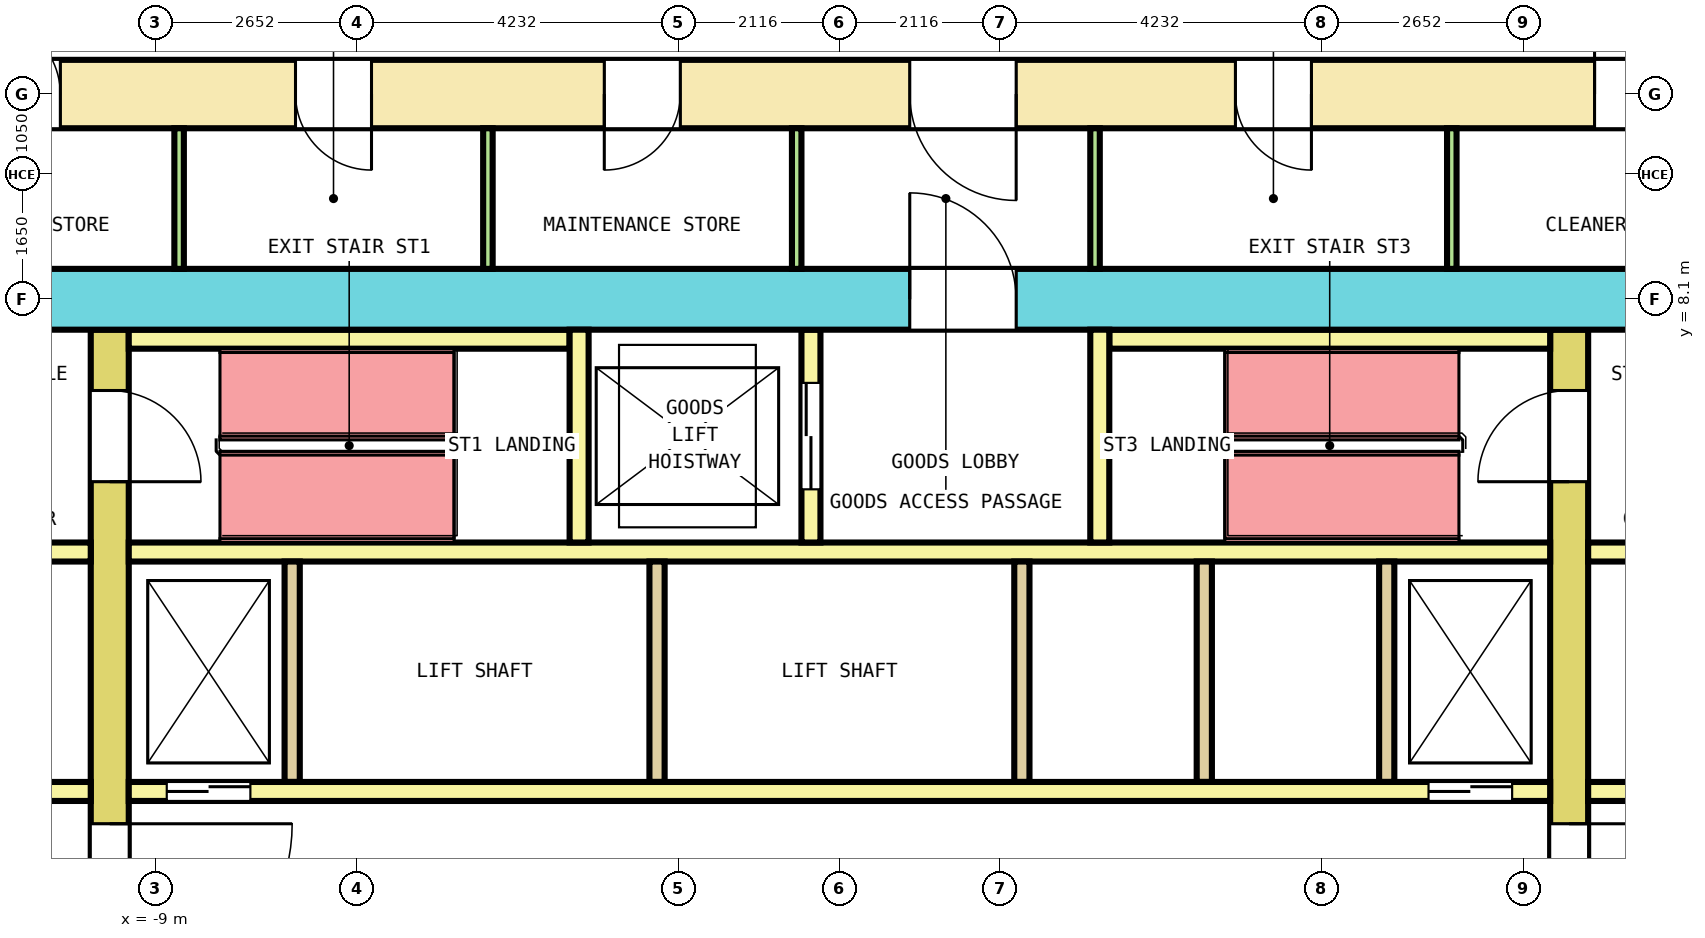
"""IFC4 building model, lengths in metres.
Left out: names, types, materials, properties, quantities, classifications, styles, units other than length and angle.
Written with IfcOpenShell. Run it as: python <this file> out.ifc"""

import sys

from ifc_helpers import new_model, si_unit, direction, frame, frame_2d, origin, place, context, subcontext, project, spatial, rectangle, extrude, element, fill, save


model = new_model("IFC4")
c1 = context("Model", 3, precision=1e-05, world=origin(), true_north=direction((0.0, 1.0)))
c2 = subcontext(c1, "Body", "Model", "MODEL_VIEW")
j1 = project(units=[si_unit("LENGTHUNIT", "METRE"), si_unit("PLANEANGLEUNIT", "RADIAN")], contexts=[c1])
p1 = place(None, origin())
s1 = spatial("IfcSite", under=j1, at=p1, CompositionType="ELEMENT")
p2 = place(p1, origin())
s2 = spatial("IfcBuilding", under=s1, at=p2, CompositionType="ELEMENT")
p3 = place(p2, frame((0.0, 0.0, 32.2)))
s3 = spatial("IfcBuildingStorey", under=s2, at=p3, CompositionType="ELEMENT", Elevation=32.2)
p4 = place(p3, frame((-13.65, 10.8, 0.0), z_axis=(0.0, 0.0, 1.0), x_axis=(1.0, 0.0, 0.0)))
e1 = element("IfcWall", 1, at=p4, inside=s3, PredefinedType="SHEAR", context=c2, shape_type="SweptSolid", body=[
    extrude(rectangle(XDim=27.3, YDim=0.9, at=frame_2d((13.65, 0.0))), origin(), (0.0, 0.0, 1.0), 4.1),
])
p5 = place(p4, frame((2.4, 0.0, 0.0)))
e2 = element("IfcOpeningElement", 2, at=p5, cuts=e1, PredefinedType="OPENING", context=c2, shape_type="SweptSolid", body=[
    extrude(rectangle(XDim=1.0, YDim=2.1, at=frame_2d((0.5, 1.05))), frame((0.0, 0.46, 0.0), z_axis=(0.0, -1.0, 0.0), x_axis=(1.0, 0.0, 0.0)), (0.0, 0.0, 1.0), 0.92),
])
p6 = place(p4, frame((6.494, 0.0, 0.0)))
e3 = element("IfcOpeningElement", 3, at=p6, cuts=e1, PredefinedType="OPENING", context=c2, shape_type="SweptSolid", body=[
    extrude(rectangle(XDim=1.0, YDim=2.1, at=frame_2d((0.5, 1.05))), frame((0.0, 0.46, 0.0), z_axis=(0.0, -1.0, 0.0), x_axis=(1.0, 0.0, 0.0)), (0.0, 0.0, 1.0), 0.92),
])
p7 = place(p4, frame((10.556, 0.0, 0.0)))
e4 = element("IfcOpeningElement", 4, at=p7, cuts=e1, PredefinedType="OPENING", context=c2, shape_type="SweptSolid", body=[
    extrude(rectangle(XDim=1.0, YDim=2.1, at=frame_2d((0.5, 1.05))), frame((0.0, 0.46, 0.0), z_axis=(0.0, -1.0, 0.0), x_axis=(1.0, 0.0, 0.0)), (0.0, 0.0, 1.0), 0.92),
])
p8 = place(p4, frame((18.859, 0.0, 0.0)))
e5 = element("IfcOpeningElement", 5, at=p8, cuts=e1, PredefinedType="OPENING", context=c2, shape_type="SweptSolid", body=[
    extrude(rectangle(XDim=1.0, YDim=2.1, at=frame_2d((0.5, 1.05))), frame((0.0, 0.46, 0.0), z_axis=(0.0, -1.0, 0.0), x_axis=(1.0, 0.0, 0.0)), (0.0, 0.0, 1.0), 0.92),
])
p9 = place(p4, frame((23.584, 0.0, 0.0)))
e6 = element("IfcOpeningElement", 6, at=p9, cuts=e1, PredefinedType="OPENING", context=c2, shape_type="SweptSolid", body=[
    extrude(rectangle(XDim=1.0, YDim=2.1, at=frame_2d((0.5, 1.05))), frame((0.0, 0.46, 0.0), z_axis=(0.0, -1.0, 0.0), x_axis=(1.0, 0.0, 0.0)), (0.0, 0.0, 1.0), 0.92),
])
p10 = place(p4, frame((14.575, 0.0, 0.0)))
e7 = element("IfcOpeningElement", 7, at=p10, cuts=e1, PredefinedType="OPENING", context=c2, shape_type="SweptSolid", body=[
    extrude(rectangle(XDim=1.4, YDim=2.1, at=frame_2d((0.7, 1.05))), frame((0.0, 0.46, 0.0), z_axis=(0.0, -1.0, 0.0), x_axis=(1.0, 0.0, 0.0)), (0.0, 0.0, 1.0), 0.92),
])
p11 = place(p3, frame((-12.75, 8.1, 0.0), z_axis=(0.0, 0.0, 1.0), x_axis=(1.0, 0.0, 0.0)))
e8 = element("IfcWall", 8, at=p11, inside=s3, PredefinedType="SHEAR", context=c2, shape_type="SweptSolid", body=[
    extrude(rectangle(XDim=25.5, YDim=0.8, at=frame_2d((12.75, 0.0))), origin(), (0.0, 0.0, 1.0), 4.1),
])
p12 = place(p11, frame((13.675, 0.0, 0.0)))
e9 = element("IfcOpeningElement", 9, at=p12, cuts=e8, PredefinedType="OPENING", context=c2, shape_type="SweptSolid", body=[
    extrude(rectangle(XDim=1.4, YDim=2.1, at=frame_2d((0.7, 1.05))), frame((0.0, 0.41, 0.0), z_axis=(0.0, -1.0, 0.0), x_axis=(1.0, 0.0, 0.0)), (0.0, 0.0, 1.0), 0.82),
])
p13 = place(p3, frame((-9.6, -7.7, 0.0), z_axis=(0.0, 0.0, 1.0), x_axis=(0.0, 1.0, 0.0)))
e10 = element("IfcWall", 10, at=p13, inside=s3, PredefinedType="SHEAR", context=c2, shape_type="SweptSolid", body=[
    extrude(rectangle(XDim=15.4, YDim=0.5, at=frame_2d((7.7, 0.0))), origin(), (0.0, 0.0, 1.0), 4.1),
])
p14 = place(p13, frame((6.5, 0.0, 0.0)))
e11 = element("IfcOpeningElement", 11, at=p14, cuts=e10, PredefinedType="OPENING", context=c2, shape_type="SweptSolid", body=[
    extrude(rectangle(XDim=2.4, YDim=2.1, at=frame_2d((1.2, 1.05))), frame((0.0, 0.26, 0.0), z_axis=(0.0, -1.0, 0.0), x_axis=(1.0, 0.0, 0.0)), (0.0, 0.0, 1.0), 0.52),
])
p15 = place(p13, frame((13.4, 0.0, 0.0)))
e12 = element("IfcOpeningElement", 12, at=p15, cuts=e10, PredefinedType="OPENING", context=c2, shape_type="SweptSolid", body=[
    extrude(rectangle(XDim=1.2, YDim=2.1, at=frame_2d((0.6, 1.05))), frame((0.0, 0.26, 0.0), z_axis=(0.0, -1.0, 0.0), x_axis=(1.0, 0.0, 0.0)), (0.0, 0.0, 1.0), 0.52),
])
p16 = place(p13, frame((0.8, 0.0, 0.0)))
e13 = element("IfcOpeningElement", 13, at=p16, cuts=e10, PredefinedType="OPENING", context=c2, shape_type="SweptSolid", body=[
    extrude(rectangle(XDim=1.2, YDim=2.1, at=frame_2d((0.6, 1.05))), frame((0.0, 0.26, 0.0), z_axis=(0.0, -1.0, 0.0), x_axis=(1.0, 0.0, 0.0)), (0.0, 0.0, 1.0), 0.52),
])
p17 = place(p3, frame((9.6, -7.7, 0.0), z_axis=(0.0, 0.0, 1.0), x_axis=(0.0, 1.0, 0.0)))
e14 = element("IfcWall", 14, at=p17, inside=s3, PredefinedType="SHEAR", context=c2, shape_type="SweptSolid", body=[
    extrude(rectangle(XDim=15.4, YDim=0.5, at=frame_2d((7.7, 0.0))), origin(), (0.0, 0.0, 1.0), 4.1),
])
p18 = place(p17, frame((6.5, 0.0, 0.0)))
e15 = element("IfcOpeningElement", 15, at=p18, cuts=e14, PredefinedType="OPENING", context=c2, shape_type="SweptSolid", body=[
    extrude(rectangle(XDim=2.4, YDim=2.1, at=frame_2d((1.2, 1.05))), frame((0.0, 0.26, 0.0), z_axis=(0.0, -1.0, 0.0), x_axis=(1.0, 0.0, 0.0)), (0.0, 0.0, 1.0), 0.52),
])
p19 = place(p17, frame((13.4, 0.0, 0.0)))
e16 = element("IfcOpeningElement", 16, at=p19, cuts=e14, PredefinedType="OPENING", context=c2, shape_type="SweptSolid", body=[
    extrude(rectangle(XDim=1.2, YDim=2.1, at=frame_2d((0.6, 1.05))), frame((0.0, 0.26, 0.0), z_axis=(0.0, -1.0, 0.0), x_axis=(1.0, 0.0, 0.0)), (0.0, 0.0, 1.0), 0.52),
])
p20 = place(p17, frame((0.9, 0.0, 0.0)))
e17 = element("IfcOpeningElement", 17, at=p20, cuts=e14, PredefinedType="OPENING", context=c2, shape_type="SweptSolid", body=[
    extrude(rectangle(XDim=1.0, YDim=2.1, at=frame_2d((0.5, 1.05))), frame((0.0, 0.26, 0.0), z_axis=(0.0, -1.0, 0.0), x_axis=(1.0, 0.0, 0.0)), (0.0, 0.0, 1.0), 0.52),
])
p21 = place(p3, frame((-12.75, 1.625, 0.0), z_axis=(0.0, 0.0, 1.0), x_axis=(1.0, 0.0, 0.0)))
e18 = element("IfcWall", 18, at=p21, inside=s3, PredefinedType="SOLIDWALL", context=c2, shape_type="SweptSolid", body=[
    extrude(rectangle(XDim=2.9, YDim=0.25, at=frame_2d((1.45, 0.0))), origin(), (0.0, 0.0, 1.0), 4.1),
])
p22 = place(p21, frame((0.9, 0.0, 0.0)))
e19 = element("IfcOpeningElement", 19, at=p22, cuts=e18, PredefinedType="OPENING", context=c2, shape_type="SweptSolid", body=[
    extrude(rectangle(XDim=1.1, YDim=2.1, at=frame_2d((0.55, 1.05))), frame((0.0, 0.135, 0.0), z_axis=(0.0, -1.0, 0.0), x_axis=(1.0, 0.0, 0.0)), (0.0, 0.0, 1.0), 0.27),
])
p23 = place(p3, frame((-9.35, 1.625, 0.0), z_axis=(0.0, 0.0, 1.0), x_axis=(1.0, 0.0, 0.0)))
e20 = element("IfcWall", 20, at=p23, inside=s3, PredefinedType="SOLIDWALL", context=c2, shape_type="SweptSolid", body=[
    extrude(rectangle(XDim=18.7, YDim=0.25, at=frame_2d((9.35, 0.0))), origin(), (0.0, 0.0, 1.0), 4.1),
])
p24 = place(p23, frame((0.5, 0.0, 0.0)))
e21 = element("IfcOpeningElement", 21, at=p24, cuts=e20, PredefinedType="OPENING", context=c2, shape_type="SweptSolid", body=[
    extrude(rectangle(XDim=1.1, YDim=2.1, at=frame_2d((0.55, 1.05))), frame((0.0, 0.135, 0.0), z_axis=(0.0, -1.0, 0.0), x_axis=(1.0, 0.0, 0.0)), (0.0, 0.0, 1.0), 0.27),
])
p25 = place(p23, frame((17.1, 0.0, 0.0)))
e22 = element("IfcOpeningElement", 22, at=p25, cuts=e20, PredefinedType="OPENING", context=c2, shape_type="SweptSolid", body=[
    extrude(rectangle(XDim=1.1, YDim=2.1, at=frame_2d((0.55, 1.05))), frame((0.0, 0.135, 0.0), z_axis=(0.0, -1.0, 0.0), x_axis=(1.0, 0.0, 0.0)), (0.0, 0.0, 1.0), 0.27),
])
p26 = place(p3, frame((9.85, 1.625, 0.0), z_axis=(0.0, 0.0, 1.0), x_axis=(1.0, 0.0, 0.0)))
e23 = element("IfcWall", 23, at=p26, inside=s3, PredefinedType="SOLIDWALL", context=c2, shape_type="SweptSolid", body=[
    extrude(rectangle(XDim=2.9, YDim=0.25, at=frame_2d((1.45, 0.0))), origin(), (0.0, 0.0, 1.0), 4.1),
])
p27 = place(p26, frame((0.9, 0.0, 0.0)))
e24 = element("IfcOpeningElement", 24, at=p27, cuts=e23, PredefinedType="OPENING", context=c2, shape_type="SweptSolid", body=[
    extrude(rectangle(XDim=1.1, YDim=2.1, at=frame_2d((0.55, 1.05))), frame((0.0, 0.135, 0.0), z_axis=(0.0, -1.0, 0.0), x_axis=(1.0, 0.0, 0.0)), (0.0, 0.0, 1.0), 0.27),
])
p28 = place(p3, frame((-12.75, 4.775, 0.0), z_axis=(0.0, 0.0, 1.0), x_axis=(1.0, 0.0, 0.0)))
e25 = element("IfcWall", 25, at=p28, inside=s3, PredefinedType="SOLIDWALL", context=c2, shape_type="SweptSolid", body=[
    extrude(rectangle(XDim=2.9, YDim=0.25, at=frame_2d((1.45, 0.0))), origin(), (0.0, 0.0, 1.0), 4.1),
])
p29 = place(p3, frame((-9.35, 4.775, 0.0), z_axis=(0.0, 0.0, 1.0), x_axis=(1.0, 0.0, 0.0)))
e26 = element("IfcWall", 26, at=p29, inside=s3, PredefinedType="SOLIDWALL", context=c2, shape_type="SweptSolid", body=[
    extrude(rectangle(XDim=18.7, YDim=0.25, at=frame_2d((9.35, 0.0))), origin(), (0.0, 0.0, 1.0), 4.1),
])
p30 = place(p3, frame((9.85, 4.775, 0.0), z_axis=(0.0, 0.0, 1.0), x_axis=(1.0, 0.0, 0.0)))
e27 = element("IfcWall", 27, at=p30, inside=s3, PredefinedType="SOLIDWALL", context=c2, shape_type="SweptSolid", body=[
    extrude(rectangle(XDim=2.9, YDim=0.25, at=frame_2d((1.45, 0.0))), origin(), (0.0, 0.0, 1.0), 4.1),
])
for number, where, z_axis, x_axis in (
    (28, (-7.2, 1.75, 0.0), (0.0, 0.0, 1.0), (0.0, 1.0, 0.0)),
    (29, (-2.4, 1.75, 0.0), (0.0, 0.0, 1.0), (0.0, 1.0, 0.0)),
    (30, (2.4, 1.75, 0.0), (0.0, 0.0, 1.0), (0.0, 1.0, 0.0)),
    (31, (4.8, 1.75, 0.0), (0.0, 0.0, 1.0), (0.0, 1.0, 0.0)),
    (32, (7.2, 1.75, 0.0), (0.0, 0.0, 1.0), (0.0, 1.0, 0.0)),
):
    element("IfcWall", number, at=place(p3, frame(where, z_axis=z_axis, x_axis=x_axis)), inside=s3, PredefinedType="SOLIDWALL", context=c2, shape_type="SweptSolid", body=[
        extrude(rectangle(XDim=2.9, YDim=0.2, at=frame_2d((1.45, 0.0))), origin(), (0.0, 0.0, 1.0), 4.1),
    ])
for number, where, z_axis, x_axis in (
    (33, (-9.35, 7.575, 0.0), (0.0, 0.0, 1.0), (1.0, 0.0, 0.0)),
    (34, (3.55, 7.575, 0.0), (0.0, 0.0, 1.0), (1.0, 0.0, 0.0)),
):
    element("IfcWall", number, at=place(p3, frame(where, z_axis=z_axis, x_axis=x_axis)), inside=s3, PredefinedType="SOLIDWALL", context=c2, shape_type="SweptSolid", body=[
        extrude(rectangle(XDim=5.8, YDim=0.25, at=frame_2d((2.9, 0.0))), origin(), (0.0, 0.0, 1.0), 4.1),
    ])
p31 = place(p3, frame((-3.425, 4.9, 0.0), z_axis=(0.0, 0.0, 1.0), x_axis=(0.0, 1.0, 0.0)))
e35 = element("IfcWall", 35, at=p31, inside=s3, PredefinedType="SOLIDWALL", context=c2, shape_type="SweptSolid", body=[
    extrude(rectangle(XDim=2.8, YDim=0.25, at=frame_2d((1.4, 0.0))), origin(), (0.0, 0.0, 1.0), 4.1),
])
p32 = place(p3, frame((-0.375, 4.9, 0.0), z_axis=(0.0, 0.0, 1.0), x_axis=(0.0, 1.0, 0.0)))
e36 = element("IfcWall", 36, at=p32, inside=s3, PredefinedType="SOLIDWALL", context=c2, shape_type="SweptSolid", body=[
    extrude(rectangle(XDim=2.8, YDim=0.25, at=frame_2d((1.4, 0.0))), origin(), (0.0, 0.0, 1.0), 4.1),
])
p33 = place(p32, frame((0.7, 0.0, 0.0)))
e37 = element("IfcOpeningElement", 37, at=p33, cuts=e36, PredefinedType="OPENING", context=c2, shape_type="SweptSolid", body=[
    extrude(rectangle(XDim=1.4, YDim=2.1, at=frame_2d((0.7, 1.05))), frame((0.0, 0.135, 0.0), z_axis=(0.0, -1.0, 0.0), x_axis=(1.0, 0.0, 0.0)), (0.0, 0.0, 1.0), 0.27),
])
p34 = place(p3, frame((3.425, 4.9, 0.0), z_axis=(0.0, 0.0, 1.0), x_axis=(0.0, 1.0, 0.0)))
e38 = element("IfcWall", 38, at=p34, inside=s3, PredefinedType="SOLIDWALL", context=c2, shape_type="SweptSolid", body=[
    extrude(rectangle(XDim=2.8, YDim=0.25, at=frame_2d((1.4, 0.0))), origin(), (0.0, 0.0, 1.0), 4.1),
])
for number, where, z_axis, x_axis in (
    (39, (-8.688, 8.5, 0.0), (0.0, 0.0, 1.0), (0.0, 1.0, 0.0)),
    (40, (-4.625, 8.5, 0.0), (0.0, 0.0, 1.0), (0.0, 1.0, 0.0)),
    (41, (-0.562, 8.5, 0.0), (0.0, 0.0, 1.0), (0.0, 1.0, 0.0)),
    (42, (3.363, 8.5, 0.0), (0.0, 0.0, 1.0), (0.0, 1.0, 0.0)),
    (43, (8.056, 8.5, 0.0), (0.0, 0.0, 1.0), (0.0, 1.0, 0.0)),
):
    element("IfcWall", number, at=place(p3, frame(where, z_axis=z_axis, x_axis=x_axis)), inside=s3, PredefinedType="PARTITIONING", context=c2, shape_type="SweptSolid", body=[
        extrude(rectangle(XDim=1.85, YDim=0.125, at=frame_2d((0.925, 0.0))), origin(), (0.0, 0.0, 1.0), 4.1),
    ])
p35 = place(p24, origin())
e44 = element("IfcDoor", 44, at=p35, inside=s3, OperationType="DOUBLE_DOOR_SLIDING", PredefinedType="DOOR", context=c2, shape_type="SweptSolid", body=[
    extrude(rectangle(XDim=1.1, YDim=2.1, at=frame_2d((0.55, 1.05))), frame((0.0, 0.075, 0.0), z_axis=(0.0, -1.0, 0.0), x_axis=(1.0, 0.0, 0.0)), (0.0, 0.0, 1.0), 0.15),
])
fill(e21, e44)
p36 = place(p25, origin())
e45 = element("IfcDoor", 45, at=p36, inside=s3, OperationType="DOUBLE_DOOR_SLIDING", PredefinedType="DOOR", context=c2, shape_type="SweptSolid", body=[
    extrude(rectangle(XDim=1.1, YDim=2.1, at=frame_2d((0.55, 1.05))), frame((0.0, 0.075, 0.0), z_axis=(0.0, -1.0, 0.0), x_axis=(1.0, 0.0, 0.0)), (0.0, 0.0, 1.0), 0.15),
])
fill(e22, e45)
p37 = place(p33, origin())
e46 = element("IfcDoor", 46, at=p37, inside=s3, OperationType="DOUBLE_DOOR_SLIDING", PredefinedType="DOOR", context=c2, shape_type="SweptSolid", body=[
    extrude(rectangle(XDim=1.4, YDim=2.1, at=frame_2d((0.7, 1.05))), frame((0.0, 0.075, 0.0), z_axis=(0.0, -1.0, 0.0), x_axis=(1.0, 0.0, 0.0)), (0.0, 0.0, 1.0), 0.15),
])
fill(e37, e46)
p38 = place(p14, origin())
e47 = element("IfcDoor", 47, at=p38, inside=s3, OperationType="DOUBLE_DOOR_SINGLE_SWING", PredefinedType="DOOR", context=c2, shape_type="SweptSolid", body=[
    extrude(rectangle(XDim=2.4, YDim=2.1, at=frame_2d((1.2, 1.05))), frame((0.0, 0.2, 0.0), z_axis=(0.0, -1.0, 0.0), x_axis=(1.0, 0.0, 0.0)), (0.0, 0.0, 1.0), 0.4),
])
fill(e11, e47)
p39 = place(p18, origin())
e48 = element("IfcDoor", 48, at=p39, inside=s3, OperationType="DOUBLE_DOOR_SINGLE_SWING", PredefinedType="DOOR", context=c2, shape_type="SweptSolid", body=[
    extrude(rectangle(XDim=2.4, YDim=2.1, at=frame_2d((1.2, 1.05))), frame((0.0, 0.2, 0.0), z_axis=(0.0, -1.0, 0.0), x_axis=(1.0, 0.0, 0.0)), (0.0, 0.0, 1.0), 0.4),
])
fill(e15, e48)
p40 = place(p15, origin())
e49 = element("IfcDoor", 49, at=p40, inside=s3, OperationType="SINGLE_SWING_RIGHT", PredefinedType="DOOR", context=c2, shape_type="SweptSolid", body=[
    extrude(rectangle(XDim=1.2, YDim=2.1, at=frame_2d((0.6, 1.05))), frame((0.0, 0.2, 0.0), z_axis=(0.0, -1.0, 0.0), x_axis=(1.0, 0.0, 0.0)), (0.0, 0.0, 1.0), 0.4),
])
fill(e12, e49)
p41 = place(p19, origin())
e50 = element("IfcDoor", 50, at=p41, inside=s3, OperationType="SINGLE_SWING_RIGHT", PredefinedType="DOOR", context=c2, shape_type="SweptSolid", body=[
    extrude(rectangle(XDim=1.2, YDim=2.1, at=frame_2d((0.6, 1.05))), frame((0.0, 0.2, 0.0), z_axis=(0.0, -1.0, 0.0), x_axis=(1.0, 0.0, 0.0)), (0.0, 0.0, 1.0), 0.4),
])
fill(e16, e50)
p42 = place(p12, origin())
e51 = element("IfcDoor", 51, at=p42, inside=s3, OperationType="DOUBLE_DOOR_SINGLE_SWING", PredefinedType="DOOR", context=c2, shape_type="SweptSolid", body=[
    extrude(rectangle(XDim=1.4, YDim=2.1, at=frame_2d((0.7, 1.05))), frame((0.0, 0.3, 0.0), z_axis=(0.0, -1.0, 0.0), x_axis=(1.0, 0.0, 0.0)), (0.0, 0.0, 1.0), 0.6),
])
fill(e9, e51)
p43 = place(p5, origin())
e52 = element("IfcDoor", 52, at=p43, inside=s3, OperationType="SINGLE_SWING_LEFT", PredefinedType="DOOR", context=c2, shape_type="SweptSolid", body=[
    extrude(rectangle(XDim=1.0, YDim=2.1, at=frame_2d((0.5, 1.05))), frame((0.0, 0.3, 0.0), z_axis=(0.0, -1.0, 0.0), x_axis=(1.0, 0.0, 0.0)), (0.0, 0.0, 1.0), 0.6),
])
fill(e2, e52)
p44 = place(p6, origin())
e53 = element("IfcDoor", 53, at=p44, inside=s3, OperationType="SINGLE_SWING_RIGHT", PredefinedType="DOOR", context=c2, shape_type="SweptSolid", body=[
    extrude(rectangle(XDim=1.0, YDim=2.1, at=frame_2d((0.5, 1.05))), frame((0.0, 0.3, 0.0), z_axis=(0.0, -1.0, 0.0), x_axis=(1.0, 0.0, 0.0)), (0.0, 0.0, 1.0), 0.6),
])
fill(e3, e53)
p45 = place(p7, origin())
e54 = element("IfcDoor", 54, at=p45, inside=s3, OperationType="SINGLE_SWING_LEFT", PredefinedType="DOOR", context=c2, shape_type="SweptSolid", body=[
    extrude(rectangle(XDim=1.0, YDim=2.1, at=frame_2d((0.5, 1.05))), frame((0.0, 0.3, 0.0), z_axis=(0.0, -1.0, 0.0), x_axis=(1.0, 0.0, 0.0)), (0.0, 0.0, 1.0), 0.6),
])
fill(e4, e54)
p46 = place(p8, origin())
e55 = element("IfcDoor", 55, at=p46, inside=s3, OperationType="SINGLE_SWING_RIGHT", PredefinedType="DOOR", context=c2, shape_type="SweptSolid", body=[
    extrude(rectangle(XDim=1.0, YDim=2.1, at=frame_2d((0.5, 1.05))), frame((0.0, 0.3, 0.0), z_axis=(0.0, -1.0, 0.0), x_axis=(1.0, 0.0, 0.0)), (0.0, 0.0, 1.0), 0.6),
])
fill(e5, e55)
p47 = place(p9, origin())
e56 = element("IfcDoor", 56, at=p47, inside=s3, OperationType="SINGLE_SWING_LEFT", PredefinedType="DOOR", context=c2, shape_type="SweptSolid", body=[
    extrude(rectangle(XDim=1.0, YDim=2.1, at=frame_2d((0.5, 1.05))), frame((0.0, 0.3, 0.0), z_axis=(0.0, -1.0, 0.0), x_axis=(1.0, 0.0, 0.0)), (0.0, 0.0, 1.0), 0.6),
])
fill(e6, e56)
p48 = place(p10, origin())
e57 = element("IfcDoor", 57, at=p48, inside=s3, OperationType="DOUBLE_DOOR_SINGLE_SWING", PredefinedType="DOOR", context=c2, shape_type="SweptSolid", body=[
    extrude(rectangle(XDim=1.4, YDim=2.1, at=frame_2d((0.7, 1.05))), frame((0.0, 0.3, 0.0), z_axis=(0.0, -1.0, 0.0), x_axis=(1.0, 0.0, 0.0)), (0.0, 0.0, 1.0), 0.6),
])
fill(e7, e57)
save(model, sys.argv[1])
